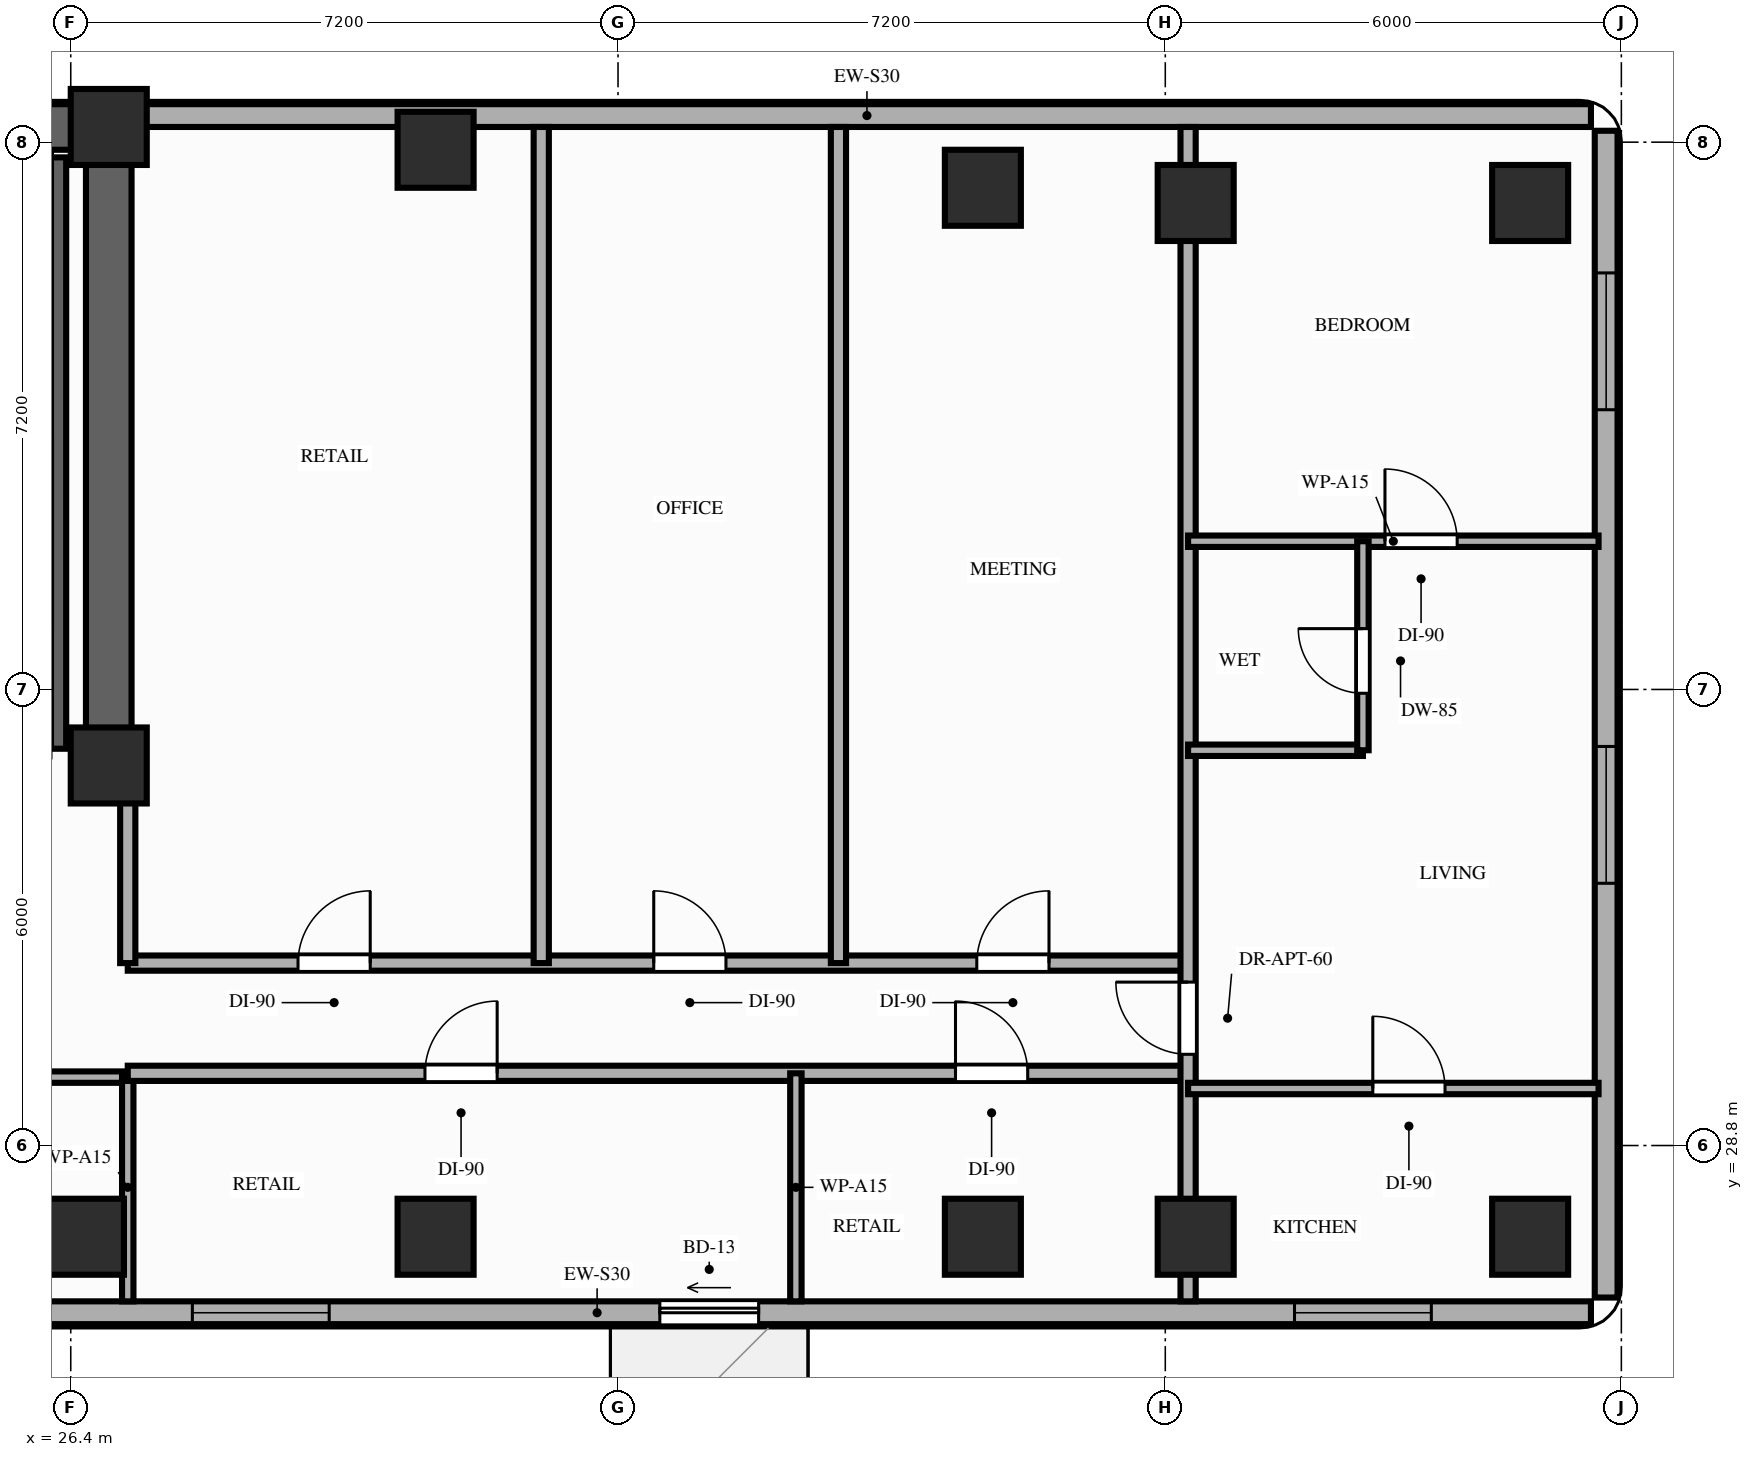
"""IFC4 building model, lengths in metres.
Left out: names, types, materials, properties, quantities, classifications, styles, units other than length and angle.
Written with IfcOpenShell. Run it as: python <this file> out.ifc"""

import sys

from ifc_helpers import new_model, si_unit, direction, frame, frame_2d, origin, origin_2d, place, context, subcontext, project, spatial, rectangle, extrude, element, fill, save


model = new_model("IFC4")
c1 = context("Model", 3, precision=1e-05, world=origin(), true_north=direction((0.0, 1.0)))
c2 = subcontext(c1, "Body", "Model", "MODEL_VIEW")
j1 = project(units=[si_unit("LENGTHUNIT", "METRE"), si_unit("PLANEANGLEUNIT", "RADIAN")], contexts=[c1])
p1 = place(None, origin())
s1 = spatial("IfcSite", under=j1, at=p1, CompositionType="ELEMENT")
p2 = place(p1, origin())
s2 = spatial("IfcBuilding", under=s1, at=p2, CompositionType="ELEMENT")
p3 = place(p2, frame((0.0, 0.0, 136.2)))
s3 = spatial("IfcBuildingStorey", under=s2, at=p3, CompositionType="ELEMENT", Elevation=136.2)
for number, where, z_axis, x_axis in (
    (1, (26.9, 33.8, 0.0), (0.0, 0.0, 1.0), (1.0, 0.0, 0.0)),
    (2, (26.9, 42.2, 0.0), (0.0, 0.0, 1.0), (1.0, 0.0, 0.0)),
    (3, (26.6, 27.6, 0.0), (0.0, 0.0, 1.0), (1.0, 0.0, 0.0)),
    (4, (31.2, 27.6, 0.0), (0.0, 0.0, 1.0), (1.0, 0.0, 0.0)),
    (5, (31.2, 41.9, 0.0), (0.0, 0.0, 1.0), (1.0, 0.0, 0.0)),
    (6, (38.4, 27.6, 0.0), (0.0, 0.0, 1.0), (1.0, 0.0, 0.0)),
    (7, (38.4, 41.4, 0.0), (0.0, 0.0, 1.0), (1.0, 0.0, 0.0)),
    (8, (41.2, 27.6, 0.0), (0.0, 0.0, 1.0), (1.0, 0.0, 0.0)),
    (9, (41.2, 41.2, 0.0), (0.0, 0.0, 1.0), (1.0, 0.0, 0.0)),
    (10, (45.6, 27.6, 0.0), (0.0, 0.0, 1.0), (1.0, 0.0, 0.0)),
    (11, (45.6, 41.2, 0.0), (0.0, 0.0, 1.0), (1.0, 0.0, 0.0)),
):
    element("IfcColumn", number, at=place(p3, frame(where, z_axis=z_axis, x_axis=x_axis)), inside=s3, PredefinedType="COLUMN", context=c2, shape_type="SweptSolid", body=[
        extrude(rectangle(XDim=1.0, YDim=1.0, at=origin_2d()), origin(), (0.0, 0.0, 1.0), 3.2),
    ])
p4 = place(p3, frame((46.4, 42.35, 0.0), z_axis=(0.0, 0.0, 1.0), x_axis=(-1.0, 0.0, 0.0)))
e12 = element("IfcWall", 12, at=p4, inside=s3, PredefinedType="STANDARD", context=c2, shape_type="SweptSolid", body=[
    extrude(rectangle(XDim=19.05, YDim=0.3, at=frame_2d((9.525, 0.0))), origin(), (0.0, 0.0, 1.0), 2.45),
])
p5 = place(p3, frame((20.25, 26.6, 0.0), z_axis=(0.0, 0.0, 1.0), x_axis=(1.0, 0.0, 0.0)))
e13 = element("IfcWall", 13, at=p5, inside=s3, PredefinedType="STANDARD", context=c2, shape_type="SweptSolid", body=[
    extrude(rectangle(XDim=26.15, YDim=0.3, at=frame_2d((13.075, 0.0))), origin(), (0.0, 0.0, 1.0), 2.71),
])
p6 = place(p5, frame((13.9, 0.0, 0.0)))
e14 = element("IfcOpeningElement", 14, at=p6, cuts=e13, PredefinedType="OPENING", context=c2, shape_type="SweptSolid", body=[
    extrude(rectangle(XDim=1.3, YDim=2.08, at=frame_2d((0.65, 1.04))), frame((0.0, 0.16, 0.0), z_axis=(0.0, -1.0, 0.0), x_axis=(1.0, 0.0, 0.0)), (0.0, 0.0, 1.0), 0.32),
])
p7 = place(p5, frame((2.25, 0.0, 0.85)))
e15 = element("IfcOpeningElement", 15, at=p7, cuts=e13, PredefinedType="OPENING", context=c2, shape_type="SweptSolid", body=[
    extrude(rectangle(XDim=1.8, YDim=1.61, at=frame_2d((0.9, 0.805))), frame((0.0, 0.16, 0.0), z_axis=(0.0, -1.0, 0.0), x_axis=(1.0, 0.0, 0.0)), (0.0, 0.0, 1.0), 0.32),
])
p8 = place(p5, frame((7.75, 0.0, 0.85)))
e16 = element("IfcOpeningElement", 16, at=p8, cuts=e13, PredefinedType="OPENING", context=c2, shape_type="SweptSolid", body=[
    extrude(rectangle(XDim=1.8, YDim=1.61, at=frame_2d((0.9, 0.805))), frame((0.0, 0.16, 0.0), z_axis=(0.0, -1.0, 0.0), x_axis=(1.0, 0.0, 0.0)), (0.0, 0.0, 1.0), 0.32),
])
p9 = place(p5, frame((22.25, 0.0, 0.85)))
e17 = element("IfcOpeningElement", 17, at=p9, cuts=e13, PredefinedType="OPENING", context=c2, shape_type="SweptSolid", body=[
    extrude(rectangle(XDim=1.8, YDim=1.61, at=frame_2d((0.9, 0.805))), frame((0.0, 0.16, 0.0), z_axis=(0.0, -1.0, 0.0), x_axis=(1.0, 0.0, 0.0)), (0.0, 0.0, 1.0), 0.32),
])
p10 = place(p3, frame((46.6, 26.8, 0.0), z_axis=(0.0, 0.0, 1.0), x_axis=(0.0, 1.0, 0.0)))
e18 = element("IfcWall", 18, at=p10, inside=s3, PredefinedType="STANDARD", context=c2, shape_type="SweptSolid", body=[
    extrude(rectangle(XDim=15.35, YDim=0.3, at=frame_2d((7.675, 0.0))), origin(), (0.0, 0.0, 1.0), 3.02),
])
p11 = place(p10, frame((5.45, 0.0, 0.85)))
e19 = element("IfcOpeningElement", 19, at=p11, cuts=e18, PredefinedType="OPENING", context=c2, shape_type="SweptSolid", body=[
    extrude(rectangle(XDim=1.8, YDim=1.75, at=frame_2d((0.9, 0.875))), frame((0.0, 0.16, 0.0), z_axis=(0.0, -1.0, 0.0), x_axis=(1.0, 0.0, 0.0)), (0.0, 0.0, 1.0), 0.32),
])
p12 = place(p10, frame((11.68, 0.0, 0.85)))
e20 = element("IfcOpeningElement", 20, at=p12, cuts=e18, PredefinedType="OPENING", context=c2, shape_type="SweptSolid", body=[
    extrude(rectangle(XDim=1.8, YDim=1.75, at=frame_2d((0.9, 0.875))), frame((0.0, 0.16, 0.0), z_axis=(0.0, -1.0, 0.0), x_axis=(1.0, 0.0, 0.0)), (0.0, 0.0, 1.0), 0.32),
])
p13 = place(p3, frame((6.45, 42.2, 0.0), z_axis=(0.0, 0.0, 1.0), x_axis=(1.0, 0.0, 0.0)))
e21 = element("IfcWall", 21, at=p13, inside=s3, PredefinedType="SHEAR", context=c2, shape_type="SweptSolid", body=[
    extrude(rectangle(XDim=20.45, YDim=0.6, at=frame_2d((10.225, 0.0))), origin(), (0.0, 0.0, 1.0), 3.02),
])
p14 = place(p3, frame((26.9, 33.8, 0.0), z_axis=(0.0, 0.0, 1.0), x_axis=(0.0, 1.0, 0.0)))
e22 = element("IfcWall", 22, at=p14, inside=s3, PredefinedType="SHEAR", context=c2, shape_type="SweptSolid", body=[
    extrude(rectangle(XDim=7.95, YDim=0.6, at=frame_2d((3.975, 0.0))), origin(), (0.0, 0.0, 1.0), 3.02),
])
p15 = place(p3, frame((26.24, 34.02, 0.0), z_axis=(0.0, 0.0, 1.0), x_axis=(0.0, 1.0, 0.0)))
e23 = element("IfcWall", 23, at=p15, inside=s3, PredefinedType="SHEAR", context=c2, shape_type="SweptSolid", body=[
    extrude(rectangle(XDim=7.78, YDim=0.2, at=frame_2d((3.89, 0.0))), origin(), (0.0, 0.0, 1.0), 3.02),
])
p16 = place(p3, frame((20.45, 29.7, 0.0), z_axis=(0.0, 0.0, 1.0), x_axis=(1.0, 0.0, 0.0)))
e24 = element("IfcWall", 24, at=p16, inside=s3, PredefinedType="PARTITIONING", context=c2, shape_type="SweptSolid", body=[
    extrude(rectangle(XDim=6.7, YDim=0.15, at=frame_2d((3.35, 0.0))), origin(), (0.0, 0.0, 1.0), 3.02),
])
p17 = place(p16, frame((2.8, 0.0, 0.0)))
e25 = element("IfcOpeningElement", 25, at=p17, cuts=e24, PredefinedType="OPENING", context=c2, shape_type="SweptSolid", body=[
    extrude(rectangle(XDim=0.95, YDim=2.15, at=frame_2d((0.475, 1.075))), frame((0.0, 0.085, 0.0), z_axis=(0.0, -1.0, 0.0), x_axis=(1.0, 0.0, 0.0)), (0.0, 0.0, 1.0), 0.17),
])
p18 = place(p3, frame((27.15, 26.75, 0.0), z_axis=(0.0, 0.0, 1.0), x_axis=(0.0, 1.0, 0.0)))
e26 = element("IfcWall", 26, at=p18, inside=s3, PredefinedType="PARTITIONING", context=c2, shape_type="SweptSolid", body=[
    extrude(rectangle(XDim=3.0, YDim=0.15, at=frame_2d((1.5, 0.0))), origin(), (0.0, 0.0, 1.0), 2.45),
])
p19 = place(p3, frame((27.15, 29.75, 0.0), z_axis=(0.0, 0.0, 1.0), x_axis=(1.0, 0.0, 0.0)))
e27 = element("IfcWall", 27, at=p19, inside=s3, PredefinedType="PARTITIONING", context=c2, shape_type="SweptSolid", body=[
    extrude(rectangle(XDim=13.95, YDim=0.2, at=frame_2d((6.975, 0.0))), origin(), (0.0, 0.0, 1.0), 2.45),
])
p20 = place(p19, frame((3.91, 0.0, 0.0)))
e28 = element("IfcOpeningElement", 28, at=p20, cuts=e27, PredefinedType="OPENING", context=c2, shape_type="SweptSolid", body=[
    extrude(rectangle(XDim=0.95, YDim=2.15, at=frame_2d((0.475, 1.075))), frame((0.0, 0.11, 0.0), z_axis=(0.0, -1.0, 0.0), x_axis=(1.0, 0.0, 0.0)), (0.0, 0.0, 1.0), 0.22),
])
p21 = place(p19, frame((10.89, 0.0, 0.0)))
e29 = element("IfcOpeningElement", 29, at=p21, cuts=e27, PredefinedType="OPENING", context=c2, shape_type="SweptSolid", body=[
    extrude(rectangle(XDim=0.95, YDim=2.15, at=frame_2d((0.475, 1.075))), frame((0.0, 0.11, 0.0), z_axis=(0.0, -1.0, 0.0), x_axis=(1.0, 0.0, 0.0)), (0.0, 0.0, 1.0), 0.22),
])
p22 = place(p3, frame((27.15, 31.2, 0.0), z_axis=(0.0, 0.0, 1.0), x_axis=(1.0, 0.0, 0.0)))
e30 = element("IfcWall", 30, at=p22, inside=s3, PredefinedType="PARTITIONING", context=c2, shape_type="SweptSolid", body=[
    extrude(rectangle(XDim=13.95, YDim=0.2, at=frame_2d((6.975, 0.0))), origin(), (0.0, 0.0, 1.0), 2.45),
])
p23 = place(p22, frame((2.24, 0.0, 0.0)))
e31 = element("IfcOpeningElement", 31, at=p23, cuts=e30, PredefinedType="OPENING", context=c2, shape_type="SweptSolid", body=[
    extrude(rectangle(XDim=0.95, YDim=2.15, at=frame_2d((0.475, 1.075))), frame((0.0, 0.11, 0.0), z_axis=(0.0, -1.0, 0.0), x_axis=(1.0, 0.0, 0.0)), (0.0, 0.0, 1.0), 0.22),
])
p24 = place(p22, frame((6.92, 0.0, 0.0)))
e32 = element("IfcOpeningElement", 32, at=p24, cuts=e30, PredefinedType="OPENING", context=c2, shape_type="SweptSolid", body=[
    extrude(rectangle(XDim=0.95, YDim=2.15, at=frame_2d((0.475, 1.075))), frame((0.0, 0.11, 0.0), z_axis=(0.0, -1.0, 0.0), x_axis=(1.0, 0.0, 0.0)), (0.0, 0.0, 1.0), 0.22),
])
p25 = place(p22, frame((11.17, 0.0, 0.0)))
e33 = element("IfcOpeningElement", 33, at=p25, cuts=e30, PredefinedType="OPENING", context=c2, shape_type="SweptSolid", body=[
    extrude(rectangle(XDim=0.95, YDim=2.15, at=frame_2d((0.475, 1.075))), frame((0.0, 0.11, 0.0), z_axis=(0.0, -1.0, 0.0), x_axis=(1.0, 0.0, 0.0)), (0.0, 0.0, 1.0), 0.22),
])
p26 = place(p3, frame((27.15, 31.2, 0.0), z_axis=(0.0, 0.0, 1.0), x_axis=(0.0, 1.0, 0.0)))
e34 = element("IfcWall", 34, at=p26, inside=s3, PredefinedType="PARTITIONING", context=c2, shape_type="SweptSolid", body=[
    extrude(rectangle(XDim=2.48, YDim=0.2, at=frame_2d((1.24, 0.0))), origin(), (0.0, 0.0, 1.0), 2.45),
])
p27 = place(p3, frame((41.1, 26.75, 0.0), z_axis=(0.0, 0.0, 1.0), x_axis=(0.0, 1.0, 0.0)))
e35 = element("IfcWall", 35, at=p27, inside=s3, PredefinedType="PARTITIONING", context=c2, shape_type="SweptSolid", body=[
    extrude(rectangle(XDim=15.45, YDim=0.2, at=frame_2d((7.725, 0.0))), origin(), (0.0, 0.0, 1.0), 2.45),
])
p28 = place(p27, frame((3.25, 0.0, 0.0)))
e36 = element("IfcOpeningElement", 36, at=p28, cuts=e35, PredefinedType="OPENING", context=c2, shape_type="SweptSolid", body=[
    extrude(rectangle(XDim=0.95, YDim=2.15, at=frame_2d((0.475, 1.075))), frame((0.0, 0.11, 0.0), z_axis=(0.0, -1.0, 0.0), x_axis=(1.0, 0.0, 0.0)), (0.0, 0.0, 1.0), 0.22),
])
p29 = place(p3, frame((41.1, 29.55, 0.0), z_axis=(0.0, 0.0, 1.0), x_axis=(1.0, 0.0, 0.0)))
e37 = element("IfcWall", 37, at=p29, inside=s3, PredefinedType="PARTITIONING", context=c2, shape_type="SweptSolid", body=[
    extrude(rectangle(XDim=5.4, YDim=0.15, at=frame_2d((2.7, 0.0))), origin(), (0.0, 0.0, 1.0), 2.45),
])
p30 = place(p29, frame((2.43, 0.0, 0.0)))
e38 = element("IfcOpeningElement", 38, at=p30, cuts=e37, PredefinedType="OPENING", context=c2, shape_type="SweptSolid", body=[
    extrude(rectangle(XDim=0.95, YDim=2.15, at=frame_2d((0.475, 1.075))), frame((0.0, 0.085, 0.0), z_axis=(0.0, -1.0, 0.0), x_axis=(1.0, 0.0, 0.0)), (0.0, 0.0, 1.0), 0.17),
])
p31 = place(p3, frame((41.1, 36.75, 0.0), z_axis=(0.0, 0.0, 1.0), x_axis=(1.0, 0.0, 0.0)))
e39 = element("IfcWall", 39, at=p31, inside=s3, PredefinedType="PARTITIONING", context=c2, shape_type="SweptSolid", body=[
    extrude(rectangle(XDim=5.4, YDim=0.15, at=frame_2d((2.7, 0.0))), origin(), (0.0, 0.0, 1.0), 2.45),
])
p32 = place(p31, frame((2.59, 0.0, 0.0)))
e40 = element("IfcOpeningElement", 40, at=p32, cuts=e39, PredefinedType="OPENING", context=c2, shape_type="SweptSolid", body=[
    extrude(rectangle(XDim=0.95, YDim=2.15, at=frame_2d((0.475, 1.075))), frame((0.0, 0.085, 0.0), z_axis=(0.0, -1.0, 0.0), x_axis=(1.0, 0.0, 0.0)), (0.0, 0.0, 1.0), 0.17),
])
p33 = place(p3, frame((41.1, 34.0, 0.0), z_axis=(0.0, 0.0, 1.0), x_axis=(1.0, 0.0, 0.0)))
e41 = element("IfcWall", 41, at=p33, inside=s3, PredefinedType="PARTITIONING", context=c2, shape_type="SweptSolid", body=[
    extrude(rectangle(XDim=2.3, YDim=0.15, at=frame_2d((1.15, 0.0))), origin(), (0.0, 0.0, 1.0), 2.45),
])
p34 = place(p3, frame((43.4, 34.0, 0.0), z_axis=(0.0, 0.0, 1.0), x_axis=(0.0, 1.0, 0.0)))
e42 = element("IfcWall", 42, at=p34, inside=s3, PredefinedType="PARTITIONING", context=c2, shape_type="SweptSolid", body=[
    extrude(rectangle(XDim=2.75, YDim=0.15, at=frame_2d((1.375, 0.0))), origin(), (0.0, 0.0, 1.0), 2.61),
])
p35 = place(p34, frame((0.75, 0.0, 0.0)))
e43 = element("IfcOpeningElement", 43, at=p35, cuts=e42, PredefinedType="OPENING", context=c2, shape_type="SweptSolid", body=[
    extrude(rectangle(XDim=0.85, YDim=2.1, at=frame_2d((0.425, 1.05))), frame((0.0, 0.085, 0.0), z_axis=(0.0, -1.0, 0.0), x_axis=(1.0, 0.0, 0.0)), (0.0, 0.0, 1.0), 0.17),
])
p36 = place(p3, frame((35.94, 26.75, 0.0), z_axis=(0.0, 0.0, 1.0), x_axis=(0.0, 1.0, 0.0)))
e44 = element("IfcWall", 44, at=p36, inside=s3, PredefinedType="PARTITIONING", context=c2, shape_type="SweptSolid", body=[
    extrude(rectangle(XDim=3.0, YDim=0.15, at=frame_2d((1.5, 0.0))), origin(), (0.0, 0.0, 1.0), 2.45),
])
for number, where, z_axis, x_axis in (
    (45, (32.59, 31.2, 0.0), (0.0, 0.0, 1.0), (0.0, 1.0, 0.0)),
    (46, (36.5, 31.2, 0.0), (0.0, 0.0, 1.0), (0.0, 1.0, 0.0)),
):
    element("IfcWall", number, at=place(p3, frame(where, z_axis=z_axis, x_axis=x_axis)), inside=s3, PredefinedType="PARTITIONING", context=c2, shape_type="SweptSolid", body=[
        extrude(rectangle(XDim=11.0, YDim=0.2, at=frame_2d((5.5, 0.0))), origin(), (0.0, 0.0, 1.0), 2.45),
    ])
p37 = place(p6, origin())
e47 = element("IfcDoor", 47, at=p37, inside=s3, OperationType="SLIDING_TO_LEFT", PredefinedType="DOOR", context=c2, shape_type="SweptSolid", body=[
    extrude(rectangle(XDim=1.3, YDim=2.08, at=frame_2d((0.65, 1.04))), frame((0.0, 0.025, 0.0), z_axis=(0.0, -1.0, 0.0), x_axis=(1.0, 0.0, 0.0)), (0.0, 0.0, 1.0), 0.05),
])
fill(e14, e47)
p38 = place(p11, origin())
e48 = element("IfcWindow", 48, at=p38, inside=s3, PartitioningType="SINGLE_PANEL", PredefinedType="WINDOW", context=c2, shape_type="SweptSolid", body=[
    extrude(rectangle(XDim=1.8, YDim=1.75, at=frame_2d((0.9, 0.875))), frame((0.0, 0.03, 0.0), z_axis=(0.0, -1.0, 0.0), x_axis=(1.0, 0.0, 0.0)), (0.0, 0.0, 1.0), 0.06),
])
fill(e19, e48)
p39 = place(p12, origin())
e49 = element("IfcWindow", 49, at=p39, inside=s3, PartitioningType="SINGLE_PANEL", PredefinedType="WINDOW", context=c2, shape_type="SweptSolid", body=[
    extrude(rectangle(XDim=1.8, YDim=1.75, at=frame_2d((0.9, 0.875))), frame((0.0, 0.03, 0.0), z_axis=(0.0, -1.0, 0.0), x_axis=(1.0, 0.0, 0.0)), (0.0, 0.0, 1.0), 0.06),
])
fill(e20, e49)
p40 = place(p8, origin())
e50 = element("IfcWindow", 50, at=p40, inside=s3, PartitioningType="SINGLE_PANEL", PredefinedType="WINDOW", context=c2, shape_type="SweptSolid", body=[
    extrude(rectangle(XDim=1.8, YDim=1.61, at=frame_2d((0.9, 0.805))), frame((0.0, 0.03, 0.0), z_axis=(0.0, -1.0, 0.0), x_axis=(1.0, 0.0, 0.0)), (0.0, 0.0, 1.0), 0.06),
])
fill(e16, e50)
p41 = place(p9, origin())
e51 = element("IfcWindow", 51, at=p41, inside=s3, PartitioningType="SINGLE_PANEL", PredefinedType="WINDOW", context=c2, shape_type="SweptSolid", body=[
    extrude(rectangle(XDim=1.8, YDim=1.61, at=frame_2d((0.9, 0.805))), frame((0.0, 0.03, 0.0), z_axis=(0.0, -1.0, 0.0), x_axis=(1.0, 0.0, 0.0)), (0.0, 0.0, 1.0), 0.06),
])
fill(e17, e51)
p42 = place(p28, origin())
e52 = element("IfcDoor", 52, at=p42, inside=s3, OperationType="SINGLE_SWING_RIGHT", PredefinedType="DOOR", context=c2, shape_type="SweptSolid", body=[
    extrude(rectangle(XDim=0.95, YDim=2.15, at=frame_2d((0.475, 1.075))), frame((0.0, 0.025, 0.0), z_axis=(0.0, -1.0, 0.0), x_axis=(1.0, 0.0, 0.0)), (0.0, 0.0, 1.0), 0.05),
])
fill(e36, e52)
p43 = place(p32, origin())
e53 = element("IfcDoor", 53, at=p43, inside=s3, OperationType="SINGLE_SWING_LEFT", PredefinedType="DOOR", context=c2, shape_type="SweptSolid", body=[
    extrude(rectangle(XDim=0.95, YDim=2.15, at=frame_2d((0.475, 1.075))), frame((0.0, 0.025, 0.0), z_axis=(0.0, -1.0, 0.0), x_axis=(1.0, 0.0, 0.0)), (0.0, 0.0, 1.0), 0.05),
])
fill(e40, e53)
p44 = place(p35, origin())
e54 = element("IfcDoor", 54, at=p44, inside=s3, OperationType="SINGLE_SWING_RIGHT", PredefinedType="DOOR", context=c2, shape_type="SweptSolid", body=[
    extrude(rectangle(XDim=0.85, YDim=2.1, at=frame_2d((0.425, 1.05))), frame((0.0, 0.025, 0.0), z_axis=(0.0, -1.0, 0.0), x_axis=(1.0, 0.0, 0.0)), (0.0, 0.0, 1.0), 0.05),
])
fill(e43, e54)
p45 = place(p30, origin())
e55 = element("IfcDoor", 55, at=p45, inside=s3, OperationType="SINGLE_SWING_LEFT", PredefinedType="DOOR", context=c2, shape_type="SweptSolid", body=[
    extrude(rectangle(XDim=0.95, YDim=2.15, at=frame_2d((0.475, 1.075))), frame((0.0, 0.025, 0.0), z_axis=(0.0, -1.0, 0.0), x_axis=(1.0, 0.0, 0.0)), (0.0, 0.0, 1.0), 0.05),
])
fill(e38, e55)
p46 = place(p20, origin())
e56 = element("IfcDoor", 56, at=p46, inside=s3, OperationType="SINGLE_SWING_RIGHT", PredefinedType="DOOR", context=c2, shape_type="SweptSolid", body=[
    extrude(rectangle(XDim=0.95, YDim=2.15, at=frame_2d((0.475, 1.075))), frame((0.0, 0.025, 0.0), z_axis=(0.0, -1.0, 0.0), x_axis=(1.0, 0.0, 0.0)), (0.0, 0.0, 1.0), 0.05),
])
fill(e28, e56)
p47 = place(p21, origin())
e57 = element("IfcDoor", 57, at=p47, inside=s3, OperationType="SINGLE_SWING_LEFT", PredefinedType="DOOR", context=c2, shape_type="SweptSolid", body=[
    extrude(rectangle(XDim=0.95, YDim=2.15, at=frame_2d((0.475, 1.075))), frame((0.0, 0.025, 0.0), z_axis=(0.0, -1.0, 0.0), x_axis=(1.0, 0.0, 0.0)), (0.0, 0.0, 1.0), 0.05),
])
fill(e29, e57)
p48 = place(p23, origin())
e58 = element("IfcDoor", 58, at=p48, inside=s3, OperationType="SINGLE_SWING_RIGHT", PredefinedType="DOOR", context=c2, shape_type="SweptSolid", body=[
    extrude(rectangle(XDim=0.95, YDim=2.15, at=frame_2d((0.475, 1.075))), frame((0.0, 0.025, 0.0), z_axis=(0.0, -1.0, 0.0), x_axis=(1.0, 0.0, 0.0)), (0.0, 0.0, 1.0), 0.05),
])
fill(e31, e58)
p49 = place(p24, origin())
e59 = element("IfcDoor", 59, at=p49, inside=s3, OperationType="SINGLE_SWING_LEFT", PredefinedType="DOOR", context=c2, shape_type="SweptSolid", body=[
    extrude(rectangle(XDim=0.95, YDim=2.15, at=frame_2d((0.475, 1.075))), frame((0.0, 0.025, 0.0), z_axis=(0.0, -1.0, 0.0), x_axis=(1.0, 0.0, 0.0)), (0.0, 0.0, 1.0), 0.05),
])
fill(e32, e59)
p50 = place(p25, origin())
e60 = element("IfcDoor", 60, at=p50, inside=s3, OperationType="SINGLE_SWING_RIGHT", PredefinedType="DOOR", context=c2, shape_type="SweptSolid", body=[
    extrude(rectangle(XDim=0.95, YDim=2.15, at=frame_2d((0.475, 1.075))), frame((0.0, 0.025, 0.0), z_axis=(0.0, -1.0, 0.0), x_axis=(1.0, 0.0, 0.0)), (0.0, 0.0, 1.0), 0.05),
])
fill(e33, e60)
save(model, sys.argv[1])
